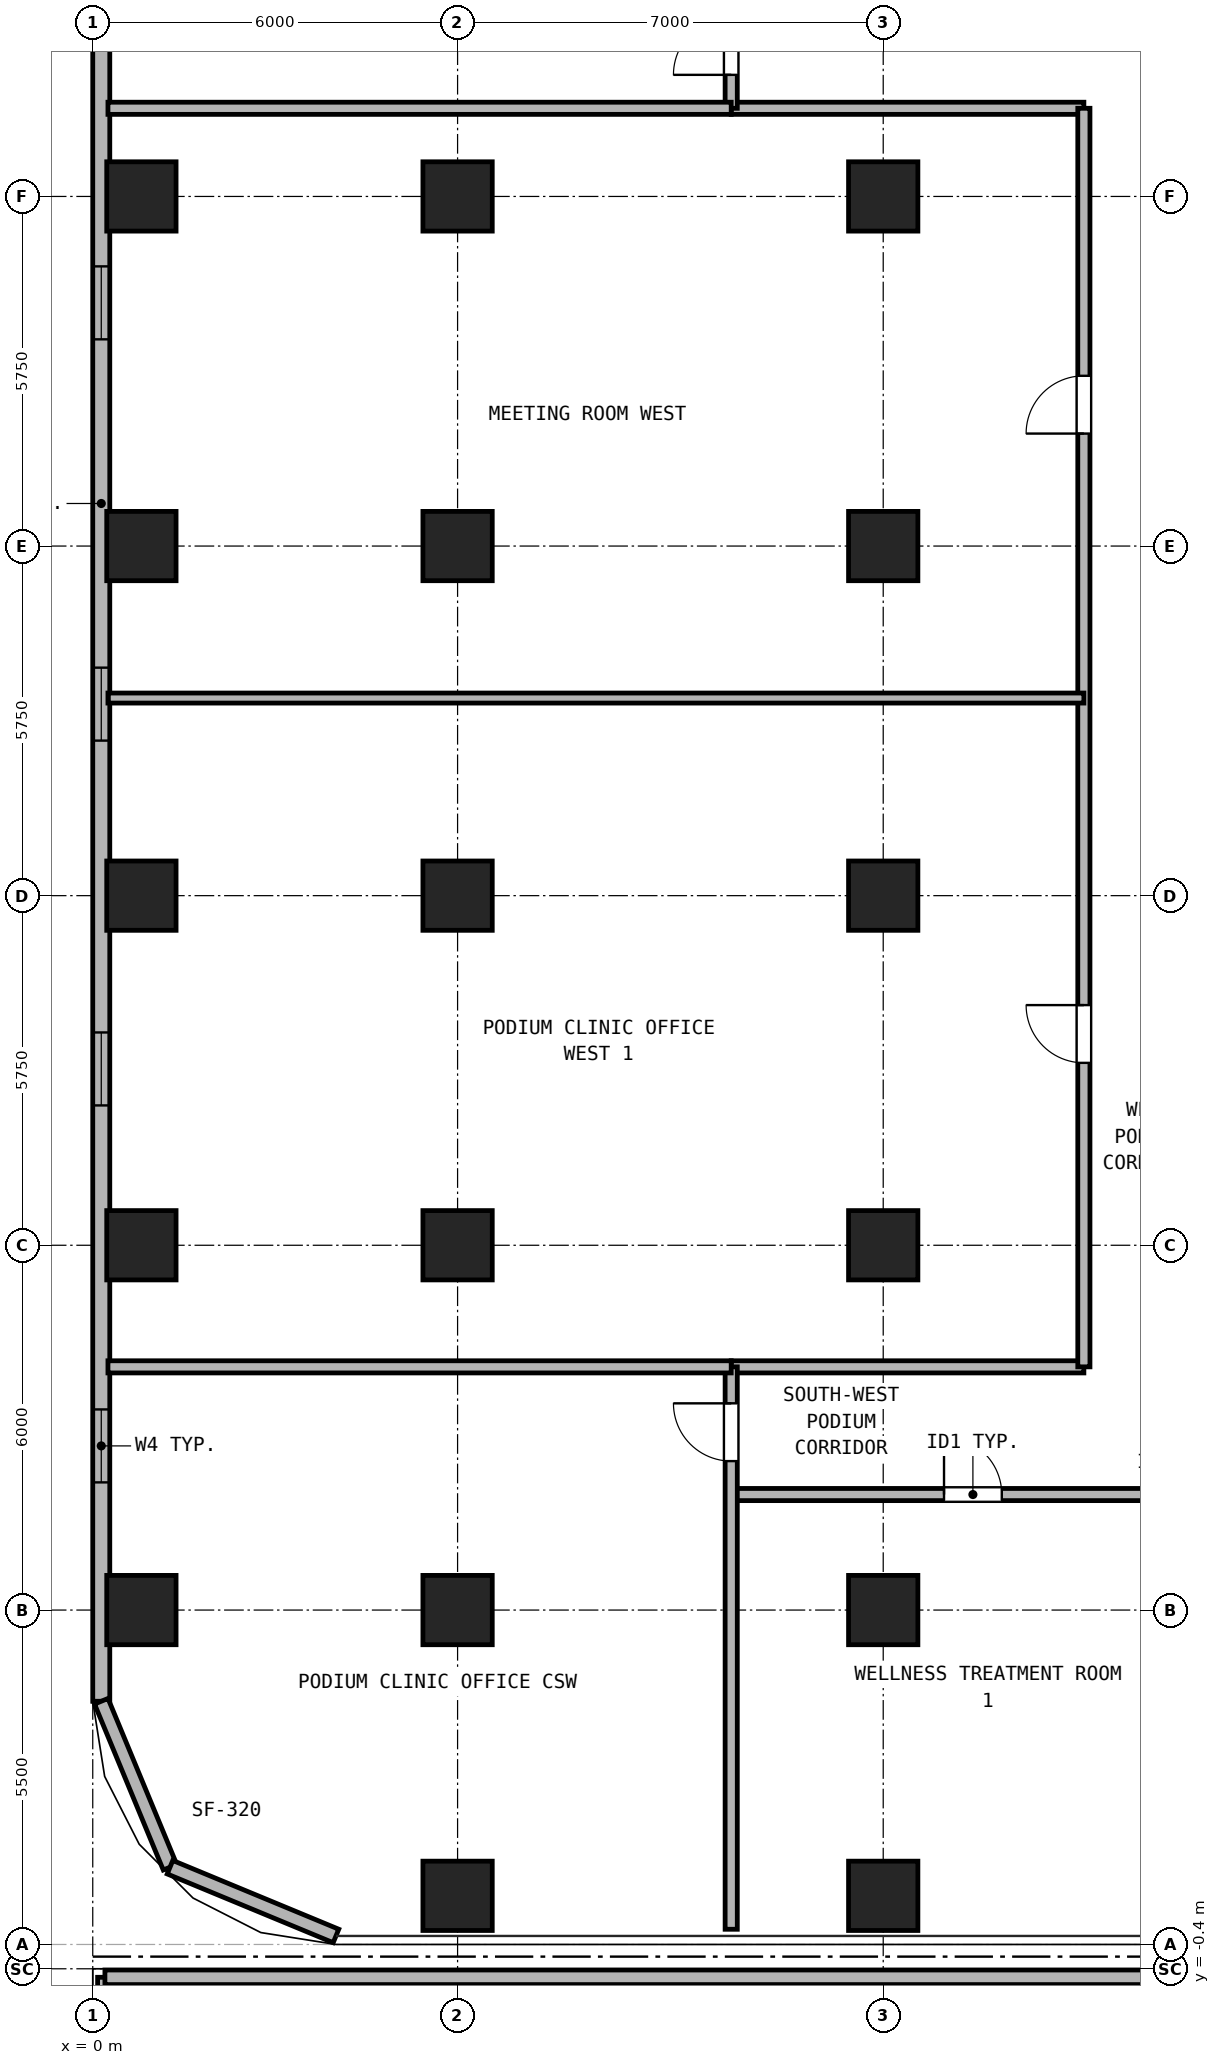
"""IFC4 building model, lengths in metres.
Left out: names, types, materials, properties, quantities, classifications, styles, units other than length and angle.
Written with IfcOpenShell. Run it as: python <this file> out.ifc"""

import sys

from ifc_helpers import new_model, si_unit, direction, frame, frame_2d, origin, origin_2d, place, context, subcontext, project, spatial, rectangle, hollow_rectangle, extrude, source, transform, mapped, element, fill, save


model = new_model("IFC4")
c1 = context("Model", 3, precision=1e-05, world=origin(), true_north=direction((0.0, 1.0)))
c2 = subcontext(c1, "Body", "Model", "MODEL_VIEW")
j1 = project(units=[si_unit("LENGTHUNIT", "METRE"), si_unit("PLANEANGLEUNIT", "RADIAN")], contexts=[c1])
p1 = place(None, origin())
s1 = spatial("IfcSite", under=j1, at=p1, CompositionType="ELEMENT")
p2 = place(p1, origin())
s2 = spatial("IfcBuilding", under=s1, at=p2, CompositionType="ELEMENT")
p3 = place(p2, frame((0.0, 0.0, 18.0)))
s3 = spatial("IfcBuildingStorey", under=s2, at=p3, CompositionType="ELEMENT", Elevation=18.0)
m1 = source(origin(), c2, "Body", "SweptSolid", [
    extrude(hollow_rectangle(XDim=1.14, YDim=1.14, WallThickness=0.07, at=origin_2d()), origin(), (0.0, 0.0, 1.0), 4.14),
])
for number, where, z_axis, x_axis in (
    (1, (6.0, 0.8, 0.0), (0.0, 0.0, 1.0), (1.0, 0.0, 0.0)),
    (2, (13.0, 0.8, 0.0), (0.0, 0.0, 1.0), (1.0, 0.0, 0.0)),
    (3, (0.8, 5.5, 0.0), (0.0, 0.0, 1.0), (1.0, 0.0, 0.0)),
    (4, (0.8, 11.5, 0.0), (0.0, 0.0, 1.0), (1.0, 0.0, 0.0)),
    (5, (0.8, 17.25, 0.0), (0.0, 0.0, 1.0), (1.0, 0.0, 0.0)),
    (6, (0.8, 23.0, 0.0), (0.0, 0.0, 1.0), (1.0, 0.0, 0.0)),
    (7, (0.8, 28.75, 0.0), (0.0, 0.0, 1.0), (1.0, 0.0, 0.0)),
    (8, (6.0, 5.5, 0.0), (0.0, 0.0, 1.0), (1.0, 0.0, 0.0)),
    (9, (6.0, 11.5, 0.0), (0.0, 0.0, 1.0), (1.0, 0.0, 0.0)),
    (10, (6.0, 17.25, 0.0), (0.0, 0.0, 1.0), (1.0, 0.0, 0.0)),
    (11, (6.0, 23.0, 0.0), (0.0, 0.0, 1.0), (1.0, 0.0, 0.0)),
    (12, (6.0, 28.75, 0.0), (0.0, 0.0, 1.0), (1.0, 0.0, 0.0)),
    (13, (13.0, 5.5, 0.0), (0.0, 0.0, 1.0), (1.0, 0.0, 0.0)),
    (14, (13.0, 11.5, 0.0), (0.0, 0.0, 1.0), (1.0, 0.0, 0.0)),
    (15, (13.0, 17.25, 0.0), (0.0, 0.0, 1.0), (1.0, 0.0, 0.0)),
    (16, (13.0, 23.0, 0.0), (0.0, 0.0, 1.0), (1.0, 0.0, 0.0)),
    (17, (13.0, 28.75, 0.0), (0.0, 0.0, 1.0), (1.0, 0.0, 0.0)),
):
    element("IfcColumn", number, at=place(p3, frame(where, z_axis=z_axis, x_axis=x_axis)), inside=s3, PredefinedType="COLUMN", context=c2, shape_type="MappedRepresentation", body=[
        mapped(m1, transform((0.0, 0.0, 0.0), x_axis=(1.0, 0.0, 0.0), y_axis=(0.0, 1.0, 0.0), z_axis=(0.0, 0.0, 1.0), scale=1.0)),
    ])
p4 = place(p3, frame((0.14, 4.0, 0.0), z_axis=(0.0, 0.0, 1.0), x_axis=(0.0, 1.0, 0.0)))
e18 = element("IfcWall", 18, at=p4, inside=s3, PredefinedType="SOLIDWALL", context=c2, shape_type="SweptSolid", body=[
    extrude(rectangle(XDim=32.5, YDim=0.28, at=frame_2d((16.25, 0.0))), origin(), (0.0, 0.0, 1.0), 4.14),
])
p5 = place(p4, frame((3.6, 0.0, 0.9)))
e19 = element("IfcOpeningElement", 19, at=p5, cuts=e18, PredefinedType="OPENING", context=c2, shape_type="SweptSolid", body=[
    extrude(rectangle(XDim=1.2, YDim=1.65, at=frame_2d((0.6, 0.825))), frame((0.0, 0.15, 0.0), z_axis=(0.0, -1.0, 0.0), x_axis=(1.0, 0.0, 0.0)), (0.0, 0.0, 1.0), 0.3),
])
p6 = place(p4, frame((9.8, 0.0, 0.9)))
e20 = element("IfcOpeningElement", 20, at=p6, cuts=e18, PredefinedType="OPENING", context=c2, shape_type="SweptSolid", body=[
    extrude(rectangle(XDim=1.2, YDim=1.65, at=frame_2d((0.6, 0.825))), frame((0.0, 0.15, 0.0), z_axis=(0.0, -1.0, 0.0), x_axis=(1.0, 0.0, 0.0)), (0.0, 0.0, 1.0), 0.3),
])
p7 = place(p4, frame((15.8, 0.0, 0.9)))
e21 = element("IfcOpeningElement", 21, at=p7, cuts=e18, PredefinedType="OPENING", context=c2, shape_type="SweptSolid", body=[
    extrude(rectangle(XDim=1.2, YDim=1.65, at=frame_2d((0.6, 0.825))), frame((0.0, 0.15, 0.0), z_axis=(0.0, -1.0, 0.0), x_axis=(1.0, 0.0, 0.0)), (0.0, 0.0, 1.0), 0.3),
])
p8 = place(p4, frame((22.4, 0.0, 0.9)))
e22 = element("IfcOpeningElement", 22, at=p8, cuts=e18, PredefinedType="OPENING", context=c2, shape_type="SweptSolid", body=[
    extrude(rectangle(XDim=1.2, YDim=1.65, at=frame_2d((0.6, 0.825))), frame((0.0, 0.15, 0.0), z_axis=(0.0, -1.0, 0.0), x_axis=(1.0, 0.0, 0.0)), (0.0, 0.0, 1.0), 0.3),
])
p9 = place(p4, frame((28.0, 0.0, 0.9)))
e23 = element("IfcOpeningElement", 23, at=p9, cuts=e18, PredefinedType="OPENING", context=c2, shape_type="SweptSolid", body=[
    extrude(rectangle(XDim=1.2, YDim=1.65, at=frame_2d((0.6, 0.825))), frame((0.0, 0.15, 0.0), z_axis=(0.0, -1.0, 0.0), x_axis=(1.0, 0.0, 0.0)), (0.0, 0.0, 1.0), 0.3),
])
for number, where, z_axis, x_axis in (
    (24, (0.14, 4.0, 0.0), (0.0, 0.0, 1.0), (0.383, -0.924, 0.0)),
    (25, (1.271, 1.271, 0.0), (0.0, 0.0, 1.0), (0.924, -0.383, 0.0)),
):
    element("IfcWall", number, at=place(p3, frame(where, z_axis=z_axis, x_axis=x_axis)), inside=s3, PredefinedType="SOLIDWALL", context=c2, shape_type="SweptSolid", body=[
        extrude(rectangle(XDim=2.954, YDim=0.24, at=frame_2d((1.477, 0.0))), origin(), (0.0, 0.0, 1.0), 4.14),
    ])
p10 = place(p3, frame((0.2, -10.95, 0.0), z_axis=(0.0, 0.0, 1.0), x_axis=(0.0, 1.0, 0.0)))
e26 = element("IfcWall", 26, at=p10, inside=s3, PredefinedType="SOLIDWALL", context=c2, shape_type="SweptSolid", body=[
    extrude(rectangle(XDim=10.41, YDim=0.24, at=frame_2d((5.205, 0.0))), origin(), (0.0, 0.0, 1.0), 4.2),
])
p11 = place(p3, frame((0.2, -0.54, 0.0), z_axis=(0.0, 0.0, 1.0), x_axis=(1.0, 0.0, 0.0)))
e27 = element("IfcWall", 27, at=p11, inside=s3, PredefinedType="SOLIDWALL", context=c2, shape_type="SweptSolid", body=[
    extrude(rectangle(XDim=47.34, YDim=0.24, at=frame_2d((23.67, 0.0))), origin(), (0.0, 0.0, 1.0), 4.2),
])
p12 = place(p3, frame((10.5, 7.4, 0.0), z_axis=(0.0, 0.0, 1.0), x_axis=(1.0, 0.0, 0.0)))
e28 = element("IfcWall", 28, at=p12, inside=s3, PredefinedType="PARTITIONING", context=c2, shape_type="SweptSolid", body=[
    extrude(rectangle(XDim=26.0, YDim=0.2, at=frame_2d((13.0, 0.0))), origin(), (0.0, 0.0, 1.0), 4.14),
])
p13 = place(p12, frame((3.5, 0.0, 0.0)))
e29 = element("IfcOpeningElement", 29, at=p13, cuts=e28, PredefinedType="OPENING", context=c2, shape_type="SweptSolid", body=[
    extrude(rectangle(XDim=0.95, YDim=2.15, at=frame_2d((0.475, 1.075))), frame((0.0, 0.11, 0.0), z_axis=(0.0, -1.0, 0.0), x_axis=(1.0, 0.0, 0.0)), (0.0, 0.0, 1.0), 0.22),
])
p14 = place(p12, frame((11.0, 0.0, 0.0)))
e30 = element("IfcOpeningElement", 30, at=p14, cuts=e28, PredefinedType="OPENING", context=c2, shape_type="SweptSolid", body=[
    extrude(rectangle(XDim=0.95, YDim=2.15, at=frame_2d((0.475, 1.075))), frame((0.0, 0.11, 0.0), z_axis=(0.0, -1.0, 0.0), x_axis=(1.0, 0.0, 0.0)), (0.0, 0.0, 1.0), 0.22),
])
p15 = place(p12, frame((17.15, 0.0, 0.0)))
e31 = element("IfcOpeningElement", 31, at=p15, cuts=e28, PredefinedType="OPENING", context=c2, shape_type="SweptSolid", body=[
    extrude(rectangle(XDim=0.95, YDim=2.15, at=frame_2d((0.475, 1.075))), frame((0.0, 0.11, 0.0), z_axis=(0.0, -1.0, 0.0), x_axis=(1.0, 0.0, 0.0)), (0.0, 0.0, 1.0), 0.22),
])
p16 = place(p12, frame((21.2, 0.0, 0.0)))
e32 = element("IfcOpeningElement", 32, at=p16, cuts=e28, PredefinedType="OPENING", context=c2, shape_type="SweptSolid", body=[
    extrude(rectangle(XDim=0.92, YDim=2.1, at=frame_2d((0.46, 1.05))), frame((0.0, 0.11, 0.0), z_axis=(0.0, -1.0, 0.0), x_axis=(1.0, 0.0, 0.0)), (0.0, 0.0, 1.0), 0.22),
])
p17 = place(p12, frame((24.05, 0.0, 0.0)))
e33 = element("IfcOpeningElement", 33, at=p17, cuts=e28, PredefinedType="OPENING", context=c2, shape_type="SweptSolid", body=[
    extrude(rectangle(XDim=0.92, YDim=2.1, at=frame_2d((0.46, 1.05))), frame((0.0, 0.11, 0.0), z_axis=(0.0, -1.0, 0.0), x_axis=(1.0, 0.0, 0.0)), (0.0, 0.0, 1.0), 0.22),
])
for number, where, z_axis, x_axis in (
    (34, (10.5, 9.5, 0.0), (0.0, 0.0, 1.0), (1.0, 0.0, 0.0)),
    (35, (10.5, 30.2, 0.0), (0.0, 0.0, 1.0), (1.0, 0.0, 0.0)),
):
    element("IfcWall", number, at=place(p3, frame(where, z_axis=z_axis, x_axis=x_axis)), inside=s3, PredefinedType="PARTITIONING", context=c2, shape_type="SweptSolid", body=[
        extrude(rectangle(XDim=5.8, YDim=0.2, at=frame_2d((2.9, 0.0))), origin(), (0.0, 0.0, 1.0), 4.14),
    ])
p18 = place(p3, frame((16.3, 9.5, 0.0), z_axis=(0.0, 0.0, 1.0), x_axis=(0.0, 1.0, 0.0)))
e36 = element("IfcWall", 36, at=p18, inside=s3, PredefinedType="PARTITIONING", context=c2, shape_type="SweptSolid", body=[
    extrude(rectangle(XDim=20.7, YDim=0.2, at=frame_2d((10.35, 0.0))), origin(), (0.0, 0.0, 1.0), 4.14),
])
p19 = place(p18, frame((5.0, 0.0, 0.0)))
e37 = element("IfcOpeningElement", 37, at=p19, cuts=e36, PredefinedType="OPENING", context=c2, shape_type="SweptSolid", body=[
    extrude(rectangle(XDim=0.95, YDim=2.15, at=frame_2d((0.475, 1.075))), frame((0.0, 0.11, 0.0), z_axis=(0.0, -1.0, 0.0), x_axis=(1.0, 0.0, 0.0)), (0.0, 0.0, 1.0), 0.22),
])
p20 = place(p18, frame((15.35, 0.0, 0.0)))
e38 = element("IfcOpeningElement", 38, at=p20, cuts=e36, PredefinedType="OPENING", context=c2, shape_type="SweptSolid", body=[
    extrude(rectangle(XDim=0.95, YDim=2.15, at=frame_2d((0.475, 1.075))), frame((0.0, 0.11, 0.0), z_axis=(0.0, -1.0, 0.0), x_axis=(1.0, 0.0, 0.0)), (0.0, 0.0, 1.0), 0.22),
])
p21 = place(p3, frame((10.5, 0.25, 0.0), z_axis=(0.0, 0.0, 1.0), x_axis=(0.0, 1.0, 0.0)))
e39 = element("IfcWall", 39, at=p21, inside=s3, PredefinedType="PARTITIONING", context=c2, shape_type="SweptSolid", body=[
    extrude(rectangle(XDim=9.25, YDim=0.2, at=frame_2d((4.625, 0.0))), origin(), (0.0, 0.0, 1.0), 4.14),
])
p22 = place(p21, frame((7.7, 0.0, 0.0)))
e40 = element("IfcOpeningElement", 40, at=p22, cuts=e39, PredefinedType="OPENING", context=c2, shape_type="SweptSolid", body=[
    extrude(rectangle(XDim=0.95, YDim=2.15, at=frame_2d((0.475, 1.075))), frame((0.0, 0.11, 0.0), z_axis=(0.0, -1.0, 0.0), x_axis=(1.0, 0.0, 0.0)), (0.0, 0.0, 1.0), 0.22),
])
p23 = place(p3, frame((10.5, 30.2, 0.0), z_axis=(0.0, 0.0, 1.0), x_axis=(0.0, 1.0, 0.0)))
e41 = element("IfcWall", 41, at=p23, inside=s3, PredefinedType="PARTITIONING", context=c2, shape_type="SweptSolid", body=[
    extrude(rectangle(XDim=10.05, YDim=0.2, at=frame_2d((5.025, 0.0))), origin(), (0.0, 0.0, 1.0), 4.14),
])
p24 = place(p23, frame((0.55, 0.0, 0.0)))
e42 = element("IfcOpeningElement", 42, at=p24, cuts=e41, PredefinedType="OPENING", context=c2, shape_type="SweptSolid", body=[
    extrude(rectangle(XDim=0.95, YDim=2.15, at=frame_2d((0.475, 1.075))), frame((0.0, 0.11, 0.0), z_axis=(0.0, -1.0, 0.0), x_axis=(1.0, 0.0, 0.0)), (0.0, 0.0, 1.0), 0.22),
])
for number, where, z_axis, x_axis in (
    (43, (0.25, 9.5, 0.0), (0.0, 0.0, 1.0), (1.0, 0.0, 0.0)),
    (44, (0.25, 30.2, 0.0), (0.0, 0.0, 1.0), (1.0, 0.0, 0.0)),
):
    element("IfcWall", number, at=place(p3, frame(where, z_axis=z_axis, x_axis=x_axis)), inside=s3, PredefinedType="PARTITIONING", context=c2, shape_type="SweptSolid", body=[
        extrude(rectangle(XDim=10.25, YDim=0.2, at=frame_2d((5.125, 0.0))), origin(), (0.0, 0.0, 1.0), 4.14),
    ])
p25 = place(p3, frame((0.25, 20.5, 0.0), z_axis=(0.0, 0.0, 1.0), x_axis=(1.0, 0.0, 0.0)))
e45 = element("IfcWall", 45, at=p25, inside=s3, PredefinedType="PARTITIONING", context=c2, shape_type="SweptSolid", body=[
    extrude(rectangle(XDim=16.05, YDim=0.165, at=frame_2d((8.025, 0.0))), origin(), (0.0, 0.0, 1.0), 4.14),
])
p26 = place(p5, origin())
e46 = element("IfcWindow", 46, at=p26, inside=s3, PartitioningType="SINGLE_PANEL", PredefinedType="WINDOW", context=c2, shape_type="SweptSolid", body=[
    extrude(rectangle(XDim=1.2, YDim=1.65, at=frame_2d((0.6, 0.825))), frame((0.0, 0.03, 0.0), z_axis=(0.0, -1.0, 0.0), x_axis=(1.0, 0.0, 0.0)), (0.0, 0.0, 1.0), 0.06),
])
fill(e19, e46)
p27 = place(p6, origin())
e47 = element("IfcWindow", 47, at=p27, inside=s3, PartitioningType="SINGLE_PANEL", PredefinedType="WINDOW", context=c2, shape_type="SweptSolid", body=[
    extrude(rectangle(XDim=1.2, YDim=1.65, at=frame_2d((0.6, 0.825))), frame((0.0, 0.03, 0.0), z_axis=(0.0, -1.0, 0.0), x_axis=(1.0, 0.0, 0.0)), (0.0, 0.0, 1.0), 0.06),
])
fill(e20, e47)
p28 = place(p7, origin())
e48 = element("IfcWindow", 48, at=p28, inside=s3, PartitioningType="SINGLE_PANEL", PredefinedType="WINDOW", context=c2, shape_type="SweptSolid", body=[
    extrude(rectangle(XDim=1.2, YDim=1.65, at=frame_2d((0.6, 0.825))), frame((0.0, 0.03, 0.0), z_axis=(0.0, -1.0, 0.0), x_axis=(1.0, 0.0, 0.0)), (0.0, 0.0, 1.0), 0.06),
])
fill(e21, e48)
p29 = place(p8, origin())
e49 = element("IfcWindow", 49, at=p29, inside=s3, PartitioningType="SINGLE_PANEL", PredefinedType="WINDOW", context=c2, shape_type="SweptSolid", body=[
    extrude(rectangle(XDim=1.2, YDim=1.65, at=frame_2d((0.6, 0.825))), frame((0.0, 0.03, 0.0), z_axis=(0.0, -1.0, 0.0), x_axis=(1.0, 0.0, 0.0)), (0.0, 0.0, 1.0), 0.06),
])
fill(e22, e49)
p30 = place(p13, frame((0.95, 0.0, 0.0), z_axis=(0.0, 0.0, 1.0), x_axis=(-1.0, 0.0, 0.0)))
e50 = element("IfcDoor", 50, at=p30, inside=s3, OperationType="SINGLE_SWING_LEFT", PredefinedType="DOOR", context=c2, shape_type="SweptSolid", body=[
    extrude(rectangle(XDim=0.95, YDim=2.15, at=frame_2d((0.475, 1.075))), frame((0.0, 0.025, 0.0), z_axis=(0.0, -1.0, 0.0), x_axis=(1.0, 0.0, 0.0)), (0.0, 0.0, 1.0), 0.05),
])
fill(e29, e50)
p31 = place(p22, frame((0.95, 0.0, 0.0), z_axis=(0.0, 0.0, 1.0), x_axis=(-1.0, 0.0, 0.0)))
e51 = element("IfcDoor", 51, at=p31, inside=s3, OperationType="SINGLE_SWING_RIGHT", PredefinedType="DOOR", context=c2, shape_type="SweptSolid", body=[
    extrude(rectangle(XDim=0.95, YDim=2.15, at=frame_2d((0.475, 1.075))), frame((0.0, 0.025, 0.0), z_axis=(0.0, -1.0, 0.0), x_axis=(1.0, 0.0, 0.0)), (0.0, 0.0, 1.0), 0.05),
])
fill(e40, e51)
p32 = place(p24, frame((0.95, 0.0, 0.0), z_axis=(0.0, 0.0, 1.0), x_axis=(-1.0, 0.0, 0.0)))
e52 = element("IfcDoor", 52, at=p32, inside=s3, OperationType="SINGLE_SWING_LEFT", PredefinedType="DOOR", context=c2, shape_type="SweptSolid", body=[
    extrude(rectangle(XDim=0.95, YDim=2.15, at=frame_2d((0.475, 1.075))), frame((0.0, 0.025, 0.0), z_axis=(0.0, -1.0, 0.0), x_axis=(1.0, 0.0, 0.0)), (0.0, 0.0, 1.0), 0.05),
])
fill(e42, e52)
p33 = place(p19, frame((0.95, 0.0, 0.0), z_axis=(0.0, 0.0, 1.0), x_axis=(-1.0, 0.0, 0.0)))
e53 = element("IfcDoor", 53, at=p33, inside=s3, OperationType="SINGLE_SWING_RIGHT", PredefinedType="DOOR", context=c2, shape_type="SweptSolid", body=[
    extrude(rectangle(XDim=0.95, YDim=2.15, at=frame_2d((0.475, 1.075))), frame((0.0, 0.025, 0.0), z_axis=(0.0, -1.0, 0.0), x_axis=(1.0, 0.0, 0.0)), (0.0, 0.0, 1.0), 0.05),
])
fill(e37, e53)
p34 = place(p20, frame((0.95, 0.0, 0.0), z_axis=(0.0, 0.0, 1.0), x_axis=(-1.0, 0.0, 0.0)))
e54 = element("IfcDoor", 54, at=p34, inside=s3, OperationType="SINGLE_SWING_LEFT", PredefinedType="DOOR", context=c2, shape_type="SweptSolid", body=[
    extrude(rectangle(XDim=0.95, YDim=2.15, at=frame_2d((0.475, 1.075))), frame((0.0, 0.025, 0.0), z_axis=(0.0, -1.0, 0.0), x_axis=(1.0, 0.0, 0.0)), (0.0, 0.0, 1.0), 0.05),
])
fill(e38, e54)
save(model, sys.argv[1])
